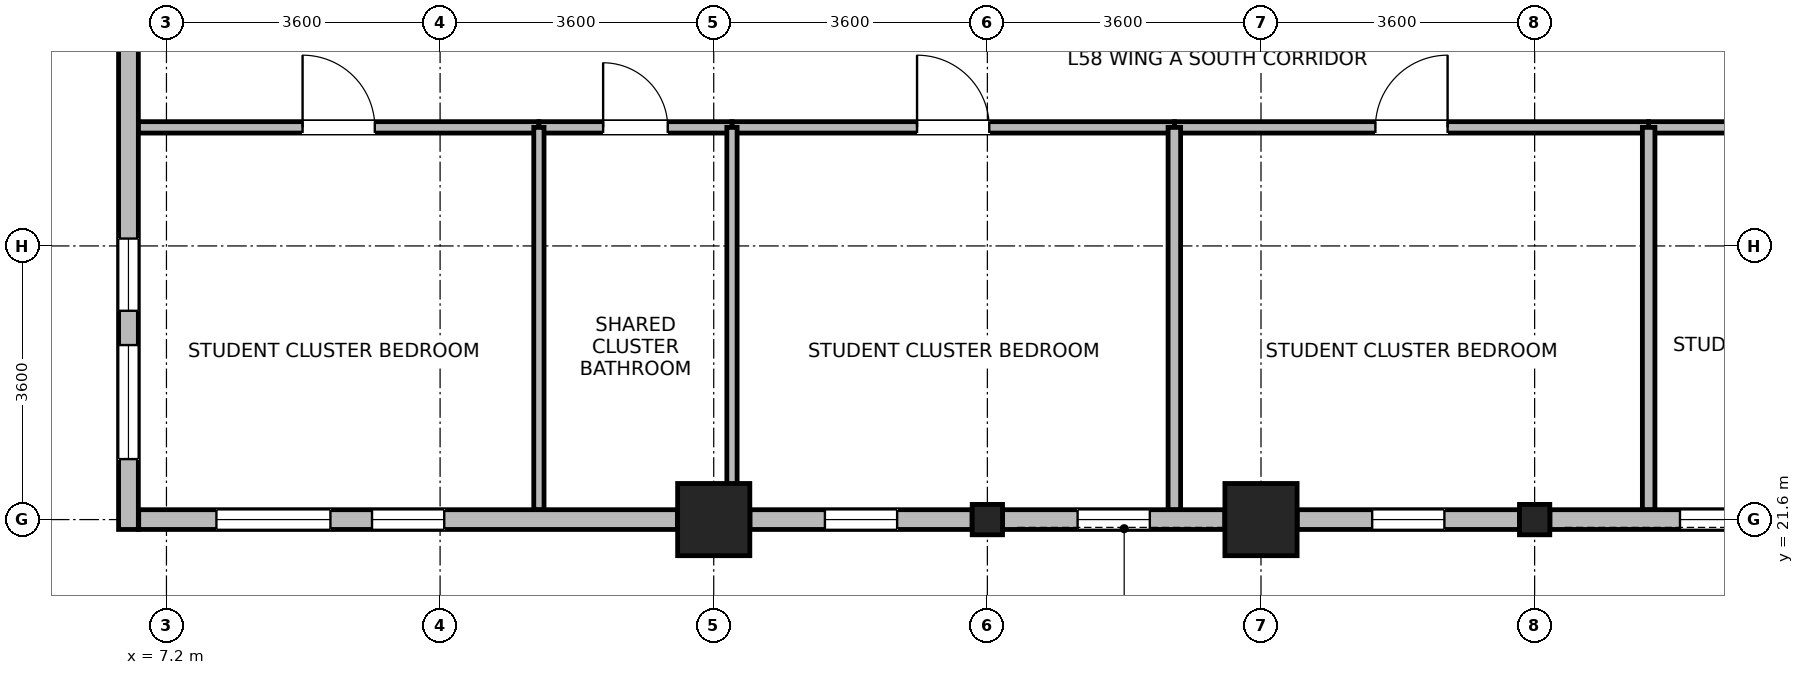
"""IFC4 building model, lengths in metres.
Left out: names, types, materials, properties, quantities, classifications, styles, units other than length and angle.
Written with IfcOpenShell. Run it as: python <this file> out.ifc"""

import sys

from ifc_helpers import new_model, si_unit, direction, frame, frame_2d, origin, origin_2d, place, context, subcontext, project, spatial, rectangle, i_section, extrude, source, transform, mapped, element, fill, save


model = new_model("IFC4")
c1 = context("Model", 3, precision=1e-05, world=origin(), true_north=direction((0.0, 1.0)))
c2 = subcontext(c1, "Body", "Model", "MODEL_VIEW")
j1 = project(units=[si_unit("LENGTHUNIT", "METRE"), si_unit("PLANEANGLEUNIT", "RADIAN")], contexts=[c1])
p1 = place(None, origin())
s1 = spatial("IfcSite", under=j1, at=p1, CompositionType="ELEMENT")
p2 = place(p1, origin())
s2 = spatial("IfcBuilding", under=s1, at=p2, CompositionType="ELEMENT")
p3 = place(p2, frame((0.0, 0.0, 227.7)))
s3 = spatial("IfcBuildingStorey", under=s2, at=p3, CompositionType="ELEMENT", Elevation=227.7)
m1 = source(origin(), c2, "Body", "SweptSolid", [
    extrude(rectangle(XDim=0.95, YDim=0.95, at=origin_2d()), origin(), (0.0, 0.0, 1.0), 3.7),
])
for number, where, z_axis, x_axis in (
    (1, (14.4, 21.6, 0.0), (0.0, 0.0, 1.0), (1.0, 0.0, 0.0)),
    (2, (21.6, 21.6, 0.0), (0.0, 0.0, 1.0), (1.0, 0.0, 0.0)),
):
    element("IfcColumn", number, at=place(p3, frame(where, z_axis=z_axis, x_axis=x_axis)), inside=s3, PredefinedType="COLUMN", context=c2, shape_type="MappedRepresentation", body=[
        mapped(m1, transform((0.0, 0.0, 0.0), x_axis=(1.0, 0.0, 0.0), y_axis=(0.0, 1.0, 0.0), z_axis=(0.0, 0.0, 1.0), scale=1.0)),
    ])
m2 = source(origin(), c2, "Body", "SweptSolid", [
    extrude(i_section(OverallWidth=0.399, OverallDepth=0.4, WebThickness=0.017, FlangeThickness=0.023, FilletRadius=0.015, at=origin_2d()), origin(), (0.0, 0.0, 1.0), 3.7),
])
for number, where, z_axis, x_axis in (
    (3, (18.0, 21.6, 0.0), (0.0, 0.0, 1.0), (1.0, 0.0, 0.0)),
    (4, (25.2, 21.6, 0.0), (0.0, 0.0, 1.0), (1.0, 0.0, 0.0)),
):
    element("IfcColumn", number, at=place(p3, frame(where, z_axis=z_axis, x_axis=x_axis)), inside=s3, PredefinedType="COLUMN", context=c2, shape_type="MappedRepresentation", body=[
        mapped(m2, transform((0.0, 0.0, 0.0), x_axis=(1.0, 0.0, 0.0), y_axis=(0.0, 1.0, 0.0), z_axis=(0.0, 0.0, 1.0), scale=1.0)),
    ])
p4 = place(p3, frame((6.7, 21.47, 0.0), z_axis=(0.0, 0.0, 1.0), x_axis=(0.0, 1.0, 0.0)))
e5 = element("IfcWall", 5, at=p4, inside=s3, PredefinedType="STANDARD", context=c2, shape_type="SweptSolid", body=[
    extrude(rectangle(XDim=6.704, YDim=0.26, at=frame_2d((3.352, 0.0))), origin(), (0.0, 0.0, 1.0), 3.45),
])
p5 = place(p4, frame((0.926, 0.0, 0.85)))
e6 = element("IfcOpeningElement", 6, at=p5, cuts=e5, PredefinedType="OPENING", context=c2, shape_type="SweptSolid", body=[
    extrude(rectangle(XDim=1.5, YDim=1.85, at=frame_2d((0.75, 0.925))), frame((0.0, 0.14, 0.0), z_axis=(0.0, -1.0, 0.0), x_axis=(1.0, 0.0, 0.0)), (0.0, 0.0, 1.0), 0.28),
])
p6 = place(p4, frame((2.877, 0.0, 0.85)))
e7 = element("IfcOpeningElement", 7, at=p6, cuts=e5, PredefinedType="OPENING", context=c2, shape_type="SweptSolid", body=[
    extrude(rectangle(XDim=0.95, YDim=1.75, at=frame_2d((0.475, 0.875))), frame((0.0, 0.14, 0.0), z_axis=(0.0, -1.0, 0.0), x_axis=(1.0, 0.0, 0.0)), (0.0, 0.0, 1.0), 0.28),
])
p7 = place(p3, frame((13.924, 21.6, 0.0), z_axis=(0.0, 0.0, 1.0), x_axis=(-1.0, 0.0, 0.0)))
e8 = element("IfcWall", 8, at=p7, inside=s3, PredefinedType="STANDARD", context=c2, shape_type="SweptSolid", body=[
    extrude(rectangle(XDim=7.089, YDim=0.26, at=frame_2d((3.544, 0.0))), origin(), (0.0, 0.0, 1.0), 3.45),
])
p8 = place(p7, frame((4.567, 0.0, 0.85)))
e9 = element("IfcOpeningElement", 9, at=p8, cuts=e8, PredefinedType="OPENING", context=c2, shape_type="SweptSolid", body=[
    extrude(rectangle(XDim=1.5, YDim=1.85, at=frame_2d((0.75, 0.925))), frame((0.0, 0.14, 0.0), z_axis=(0.0, -1.0, 0.0), x_axis=(1.0, 0.0, 0.0)), (0.0, 0.0, 1.0), 0.28),
])
p9 = place(p7, frame((3.07, 0.0, 0.85)))
e10 = element("IfcOpeningElement", 10, at=p9, cuts=e8, PredefinedType="OPENING", context=c2, shape_type="SweptSolid", body=[
    extrude(rectangle(XDim=0.95, YDim=1.75, at=frame_2d((0.475, 0.875))), frame((0.0, 0.14, 0.0), z_axis=(0.0, -1.0, 0.0), x_axis=(1.0, 0.0, 0.0)), (0.0, 0.0, 1.0), 0.28),
])
p10 = place(p3, frame((17.8, 21.6, 0.0), z_axis=(0.0, 0.0, 1.0), x_axis=(-1.0, 0.0, 0.0)))
e11 = element("IfcWall", 11, at=p10, inside=s3, PredefinedType="STANDARD", context=c2, shape_type="SweptSolid", body=[
    extrude(rectangle(XDim=2.924, YDim=0.26, at=frame_2d((1.462, 0.0))), origin(), (0.0, 0.0, 1.0), 3.05),
])
p11 = place(p10, frame((0.987, 0.0, 0.85)))
e12 = element("IfcOpeningElement", 12, at=p11, cuts=e11, PredefinedType="OPENING", context=c2, shape_type="SweptSolid", body=[
    extrude(rectangle(XDim=0.95, YDim=1.75, at=frame_2d((0.475, 0.875))), frame((0.0, 0.14, 0.0), z_axis=(0.0, -1.0, 0.0), x_axis=(1.0, 0.0, 0.0)), (0.0, 0.0, 1.0), 0.28),
])
p12 = place(p3, frame((21.124, 21.6, 0.0), z_axis=(0.0, 0.0, 1.0), x_axis=(-1.0, 0.0, 0.0)))
e13 = element("IfcWall", 13, at=p12, inside=s3, PredefinedType="STANDARD", context=c2, shape_type="SweptSolid", body=[
    extrude(rectangle(XDim=2.924, YDim=0.26, at=frame_2d((1.462, 0.0))), origin(), (0.0, 0.0, 1.0), 3.05),
])
p13 = place(p12, frame((0.987, 0.0, 0.85)))
e14 = element("IfcOpeningElement", 14, at=p13, cuts=e13, PredefinedType="OPENING", context=c2, shape_type="SweptSolid", body=[
    extrude(rectangle(XDim=0.95, YDim=1.75, at=frame_2d((0.475, 0.875))), frame((0.0, 0.14, 0.0), z_axis=(0.0, -1.0, 0.0), x_axis=(1.0, 0.0, 0.0)), (0.0, 0.0, 1.0), 0.28),
])
p14 = place(p3, frame((25.0, 21.6, 0.0), z_axis=(0.0, 0.0, 1.0), x_axis=(-1.0, 0.0, 0.0)))
e15 = element("IfcWall", 15, at=p14, inside=s3, PredefinedType="STANDARD", context=c2, shape_type="SweptSolid", body=[
    extrude(rectangle(XDim=2.924, YDim=0.26, at=frame_2d((1.462, 0.0))), origin(), (0.0, 0.0, 1.0), 3.05),
])
p15 = place(p14, frame((0.987, 0.0, 0.85)))
e16 = element("IfcOpeningElement", 16, at=p15, cuts=e15, PredefinedType="OPENING", context=c2, shape_type="SweptSolid", body=[
    extrude(rectangle(XDim=0.95, YDim=1.75, at=frame_2d((0.475, 0.875))), frame((0.0, 0.14, 0.0), z_axis=(0.0, -1.0, 0.0), x_axis=(1.0, 0.0, 0.0)), (0.0, 0.0, 1.0), 0.28),
])
p16 = place(p3, frame((28.324, 21.6, 0.0), z_axis=(0.0, 0.0, 1.0), x_axis=(-1.0, 0.0, 0.0)))
e17 = element("IfcWall", 17, at=p16, inside=s3, PredefinedType="STANDARD", context=c2, shape_type="SweptSolid", body=[
    extrude(rectangle(XDim=2.924, YDim=0.26, at=frame_2d((1.462, 0.0))), origin(), (0.0, 0.0, 1.0), 3.05),
])
p17 = place(p16, frame((0.262, 0.0, 0.85)))
e18 = element("IfcOpeningElement", 18, at=p17, cuts=e17, PredefinedType="OPENING", context=c2, shape_type="SweptSolid", body=[
    extrude(rectangle(XDim=0.95, YDim=1.75, at=frame_2d((0.475, 0.875))), frame((0.0, 0.14, 0.0), z_axis=(0.0, -1.0, 0.0), x_axis=(1.0, 0.0, 0.0)), (0.0, 0.0, 1.0), 0.28),
])
p18 = place(p3, frame((26.7, 26.76, 0.0), z_axis=(0.0, 0.0, 1.0), x_axis=(1.0, 0.0, 0.0)))
e19 = element("IfcWall", 19, at=p18, inside=s3, PredefinedType="PARTITIONING", context=c2, shape_type="SweptSolid", body=[
    extrude(rectangle(XDim=6.66, YDim=0.15, at=frame_2d((3.33, 0.0))), origin(), (0.0, 0.0, 1.0), 3.45),
])
p19 = place(p18, frame((2.855, 0.0, 0.0)))
e20 = element("IfcOpeningElement", 20, at=p19, cuts=e19, PredefinedType="OPENING", context=c2, shape_type="SweptSolid", body=[
    extrude(rectangle(XDim=0.95, YDim=2.1, at=frame_2d((0.475, 1.05))), frame((0.0, 0.085, 0.0), z_axis=(0.0, -1.0, 0.0), x_axis=(1.0, 0.0, 0.0)), (0.0, 0.0, 1.0), 0.17),
])
p20 = place(p3, frame((20.46, 26.76, 0.0), z_axis=(0.0, 0.0, 1.0), x_axis=(1.0, 0.0, 0.0)))
e21 = element("IfcWall", 21, at=p20, inside=s3, PredefinedType="PARTITIONING", context=c2, shape_type="SweptSolid", body=[
    extrude(rectangle(XDim=6.24, YDim=0.15, at=frame_2d((3.12, 0.0))), origin(), (0.0, 0.0, 1.0), 3.45),
])
p21 = place(p20, frame((2.645, 0.0, 0.0)))
e22 = element("IfcOpeningElement", 22, at=p21, cuts=e21, PredefinedType="OPENING", context=c2, shape_type="SweptSolid", body=[
    extrude(rectangle(XDim=0.95, YDim=2.1, at=frame_2d((0.475, 1.05))), frame((0.0, 0.085, 0.0), z_axis=(0.0, -1.0, 0.0), x_axis=(1.0, 0.0, 0.0)), (0.0, 0.0, 1.0), 0.17),
])
p22 = place(p3, frame((14.64, 26.76, 0.0), z_axis=(0.0, 0.0, 1.0), x_axis=(1.0, 0.0, 0.0)))
e23 = element("IfcWall", 23, at=p22, inside=s3, PredefinedType="PARTITIONING", context=c2, shape_type="SweptSolid", body=[
    extrude(rectangle(XDim=5.82, YDim=0.15, at=frame_2d((2.91, 0.0))), origin(), (0.0, 0.0, 1.0), 3.45),
])
p23 = place(p22, frame((2.435, 0.0, 0.0)))
e24 = element("IfcOpeningElement", 24, at=p23, cuts=e23, PredefinedType="OPENING", context=c2, shape_type="SweptSolid", body=[
    extrude(rectangle(XDim=0.95, YDim=2.1, at=frame_2d((0.475, 1.05))), frame((0.0, 0.085, 0.0), z_axis=(0.0, -1.0, 0.0), x_axis=(1.0, 0.0, 0.0)), (0.0, 0.0, 1.0), 0.17),
])
p24 = place(p3, frame((6.832, 26.76, 0.0), z_axis=(0.0, 0.0, 1.0), x_axis=(1.0, 0.0, 0.0)))
e25 = element("IfcWall", 25, at=p24, inside=s3, PredefinedType="PARTITIONING", context=c2, shape_type="SweptSolid", body=[
    extrude(rectangle(XDim=5.268, YDim=0.15, at=frame_2d((2.634, 0.0))), origin(), (0.0, 0.0, 1.0), 3.45),
])
p25 = place(p24, frame((2.159, 0.0, 0.0)))
e26 = element("IfcOpeningElement", 26, at=p25, cuts=e25, PredefinedType="OPENING", context=c2, shape_type="SweptSolid", body=[
    extrude(rectangle(XDim=0.95, YDim=2.1, at=frame_2d((0.475, 1.05))), frame((0.0, 0.085, 0.0), z_axis=(0.0, -1.0, 0.0), x_axis=(1.0, 0.0, 0.0)), (0.0, 0.0, 1.0), 0.17),
])
p26 = place(p3, frame((12.1, 26.76, 0.0), z_axis=(0.0, 0.0, 1.0), x_axis=(1.0, 0.0, 0.0)))
e27 = element("IfcWall", 27, at=p26, inside=s3, PredefinedType="PARTITIONING", context=c2, shape_type="SweptSolid", body=[
    extrude(rectangle(XDim=2.54, YDim=0.15, at=frame_2d((1.27, 0.0))), origin(), (0.0, 0.0, 1.0), 3.45),
])
p27 = place(p26, frame((0.845, 0.0, 0.0)))
e28 = element("IfcOpeningElement", 28, at=p27, cuts=e27, PredefinedType="OPENING", context=c2, shape_type="SweptSolid", body=[
    extrude(rectangle(XDim=0.85, YDim=2.04, at=frame_2d((0.425, 1.02))), frame((0.0, 0.085, 0.0), z_axis=(0.0, -1.0, 0.0), x_axis=(1.0, 0.0, 0.0)), (0.0, 0.0, 1.0), 0.17),
])
for number, where, z_axis, x_axis in (
    (29, (12.1, 21.732, 0.0), (0.0, 0.0, 1.0), (0.0, 1.0, 0.0)),
    (30, (14.64, 21.732, 0.0), (0.0, 0.0, 1.0), (0.0, 1.0, 0.0)),
):
    element("IfcWall", number, at=place(p3, frame(where, z_axis=z_axis, x_axis=x_axis)), inside=s3, PredefinedType="PARTITIONING", context=c2, shape_type="SweptSolid", body=[
        extrude(rectangle(XDim=5.028, YDim=0.135, at=frame_2d((2.514, 0.0))), origin(), (0.0, 0.0, 1.0), 3.45),
    ])
for number, where, z_axis, x_axis in (
    (31, (20.46, 21.732, 0.0), (0.0, 0.0, 1.0), (0.0, 1.0, 0.0)),
    (32, (26.7, 21.732, 0.0), (0.0, 0.0, 1.0), (0.0, 1.0, 0.0)),
):
    element("IfcWall", number, at=place(p3, frame(where, z_axis=z_axis, x_axis=x_axis)), inside=s3, PredefinedType="PARTITIONING", context=c2, shape_type="SweptSolid", body=[
        extrude(rectangle(XDim=5.028, YDim=0.165, at=frame_2d((2.514, 0.0))), origin(), (0.0, 0.0, 1.0), 3.45),
    ])
p28 = place(p5, origin())
e33 = element("IfcWindow", 33, at=p28, inside=s3, PartitioningType="SINGLE_PANEL", PredefinedType="WINDOW", context=c2, shape_type="SweptSolid", body=[
    extrude(rectangle(XDim=1.5, YDim=1.85, at=frame_2d((0.75, 0.925))), frame((0.0, 0.03, 0.0), z_axis=(0.0, -1.0, 0.0), x_axis=(1.0, 0.0, 0.0)), (0.0, 0.0, 1.0), 0.06),
])
fill(e6, e33)
p29 = place(p6, origin())
e34 = element("IfcWindow", 34, at=p29, inside=s3, PartitioningType="SINGLE_PANEL", PredefinedType="WINDOW", context=c2, shape_type="SweptSolid", body=[
    extrude(rectangle(XDim=0.95, YDim=1.75, at=frame_2d((0.475, 0.875))), frame((0.0, 0.03, 0.0), z_axis=(0.0, -1.0, 0.0), x_axis=(1.0, 0.0, 0.0)), (0.0, 0.0, 1.0), 0.06),
])
fill(e7, e34)
p30 = place(p8, origin())
e35 = element("IfcWindow", 35, at=p30, inside=s3, PartitioningType="SINGLE_PANEL", PredefinedType="WINDOW", context=c2, shape_type="SweptSolid", body=[
    extrude(rectangle(XDim=1.5, YDim=1.85, at=frame_2d((0.75, 0.925))), frame((0.0, 0.03, 0.0), z_axis=(0.0, -1.0, 0.0), x_axis=(1.0, 0.0, 0.0)), (0.0, 0.0, 1.0), 0.06),
])
fill(e9, e35)
p31 = place(p9, origin())
e36 = element("IfcWindow", 36, at=p31, inside=s3, PartitioningType="SINGLE_PANEL", PredefinedType="WINDOW", context=c2, shape_type="SweptSolid", body=[
    extrude(rectangle(XDim=0.95, YDim=1.75, at=frame_2d((0.475, 0.875))), frame((0.0, 0.03, 0.0), z_axis=(0.0, -1.0, 0.0), x_axis=(1.0, 0.0, 0.0)), (0.0, 0.0, 1.0), 0.06),
])
fill(e10, e36)
p32 = place(p11, origin())
e37 = element("IfcWindow", 37, at=p32, inside=s3, PartitioningType="SINGLE_PANEL", PredefinedType="WINDOW", context=c2, shape_type="SweptSolid", body=[
    extrude(rectangle(XDim=0.95, YDim=1.75, at=frame_2d((0.475, 0.875))), frame((0.0, 0.03, 0.0), z_axis=(0.0, -1.0, 0.0), x_axis=(1.0, 0.0, 0.0)), (0.0, 0.0, 1.0), 0.06),
])
fill(e12, e37)
p33 = place(p13, origin())
e38 = element("IfcWindow", 38, at=p33, inside=s3, PartitioningType="SINGLE_PANEL", PredefinedType="WINDOW", context=c2, shape_type="SweptSolid", body=[
    extrude(rectangle(XDim=0.95, YDim=1.75, at=frame_2d((0.475, 0.875))), frame((0.0, 0.03, 0.0), z_axis=(0.0, -1.0, 0.0), x_axis=(1.0, 0.0, 0.0)), (0.0, 0.0, 1.0), 0.06),
])
fill(e14, e38)
p34 = place(p15, origin())
e39 = element("IfcWindow", 39, at=p34, inside=s3, PartitioningType="SINGLE_PANEL", PredefinedType="WINDOW", context=c2, shape_type="SweptSolid", body=[
    extrude(rectangle(XDim=0.95, YDim=1.75, at=frame_2d((0.475, 0.875))), frame((0.0, 0.03, 0.0), z_axis=(0.0, -1.0, 0.0), x_axis=(1.0, 0.0, 0.0)), (0.0, 0.0, 1.0), 0.06),
])
fill(e16, e39)
p35 = place(p17, origin())
e40 = element("IfcWindow", 40, at=p35, inside=s3, PartitioningType="SINGLE_PANEL", PredefinedType="WINDOW", context=c2, shape_type="SweptSolid", body=[
    extrude(rectangle(XDim=0.95, YDim=1.75, at=frame_2d((0.475, 0.875))), frame((0.0, 0.03, 0.0), z_axis=(0.0, -1.0, 0.0), x_axis=(1.0, 0.0, 0.0)), (0.0, 0.0, 1.0), 0.06),
])
fill(e18, e40)
p36 = place(p21, origin())
e41 = element("IfcDoor", 41, at=p36, inside=s3, OperationType="SINGLE_SWING_RIGHT", PredefinedType="DOOR", context=c2, shape_type="SweptSolid", body=[
    extrude(rectangle(XDim=0.95, YDim=2.1, at=frame_2d((0.475, 1.05))), frame((0.0, 0.025, 0.0), z_axis=(0.0, -1.0, 0.0), x_axis=(1.0, 0.0, 0.0)), (0.0, 0.0, 1.0), 0.05),
])
fill(e22, e41)
p37 = place(p23, origin())
e42 = element("IfcDoor", 42, at=p37, inside=s3, OperationType="SINGLE_SWING_LEFT", PredefinedType="DOOR", context=c2, shape_type="SweptSolid", body=[
    extrude(rectangle(XDim=0.95, YDim=2.1, at=frame_2d((0.475, 1.05))), frame((0.0, 0.025, 0.0), z_axis=(0.0, -1.0, 0.0), x_axis=(1.0, 0.0, 0.0)), (0.0, 0.0, 1.0), 0.05),
])
fill(e24, e42)
p38 = place(p25, origin())
e43 = element("IfcDoor", 43, at=p38, inside=s3, OperationType="SINGLE_SWING_LEFT", PredefinedType="DOOR", context=c2, shape_type="SweptSolid", body=[
    extrude(rectangle(XDim=0.95, YDim=2.1, at=frame_2d((0.475, 1.05))), frame((0.0, 0.025, 0.0), z_axis=(0.0, -1.0, 0.0), x_axis=(1.0, 0.0, 0.0)), (0.0, 0.0, 1.0), 0.05),
])
fill(e26, e43)
p39 = place(p27, origin())
e44 = element("IfcDoor", 44, at=p39, inside=s3, OperationType="SINGLE_SWING_LEFT", PredefinedType="DOOR", context=c2, shape_type="SweptSolid", body=[
    extrude(rectangle(XDim=0.85, YDim=2.04, at=frame_2d((0.425, 1.02))), frame((0.0, 0.025, 0.0), z_axis=(0.0, -1.0, 0.0), x_axis=(1.0, 0.0, 0.0)), (0.0, 0.0, 1.0), 0.05),
])
fill(e28, e44)
save(model, sys.argv[1])
